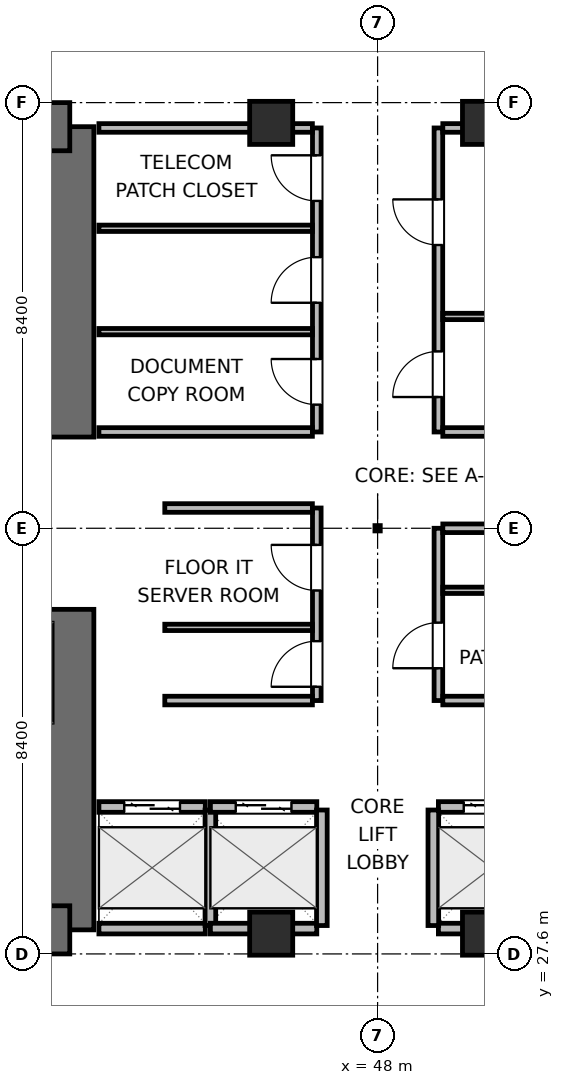
"""IFC4 building model, lengths in metres.
Left out: names, types, materials, properties, quantities, classifications, styles, units other than length and angle.
Written with IfcOpenShell. Run it as: python <this file> out.ifc"""

import sys

from ifc_helpers import new_model, si_unit, direction, frame, frame_2d, origin, origin_2d, place, context, subcontext, project, spatial, rectangle, extrude, element, fill, save


model = new_model("IFC4")
c1 = context("Model", 3, precision=1e-05, world=origin(), true_north=direction((0.0, 1.0)))
c2 = subcontext(c1, "Body", "Model", "MODEL_VIEW")
j1 = project(units=[si_unit("LENGTHUNIT", "METRE"), si_unit("PLANEANGLEUNIT", "RADIAN")], contexts=[c1])
p1 = place(None, origin())
s1 = spatial("IfcSite", under=j1, at=p1, CompositionType="ELEMENT")
p2 = place(p1, origin())
s2 = spatial("IfcBuilding", under=s1, at=p2, CompositionType="ELEMENT")
p3 = place(p2, frame((0.0, 0.0, 41.1)))
s3 = spatial("IfcBuildingStorey", under=s2, at=p3, CompositionType="ELEMENT", Elevation=41.1)
p4 = place(p3, frame((41.925, 28.075, 0.0), z_axis=(0.0, 0.0, 1.0), x_axis=(0.0, 1.0, 0.0)))
e1 = element("IfcWall", 1, at=p4, inside=s3, PredefinedType="SHEAR", context=c2, shape_type="SweptSolid", body=[
    extrude(rectangle(XDim=6.325, YDim=0.95, at=frame_2d((3.163, 0.0))), origin(), (0.0, 0.0, 1.0), 3.9),
])
p5 = place(p3, frame((41.925, 37.8, 0.0), z_axis=(0.0, 0.0, 1.0), x_axis=(0.0, 1.0, 0.0)))
e2 = element("IfcWall", 2, at=p5, inside=s3, PredefinedType="SHEAR", context=c2, shape_type="SweptSolid", body=[
    extrude(rectangle(XDim=6.125, YDim=0.95, at=frame_2d((3.062, 0.0))), origin(), (0.0, 0.0, 1.0), 3.9),
])
p6 = place(p3, frame((32.875, 28.075, 0.0), z_axis=(0.0, 0.0, 1.0), x_axis=(1.0, 0.0, 0.0)))
e3 = element("IfcWall", 3, at=p6, inside=s3, PredefinedType="SHEAR", context=c2, shape_type="SweptSolid", body=[
    extrude(rectangle(XDim=9.05, YDim=0.95, at=frame_2d((4.525, 0.0))), origin(), (0.0, 0.0, 1.0), 3.9),
])
p7 = place(p6, frame((4.975, 0.0, 0.0)))
e4 = element("IfcOpeningElement", 4, at=p7, cuts=e3, PredefinedType="OPENING", context=c2, shape_type="SweptSolid", body=[
    extrude(rectangle(XDim=1.05, YDim=2.04, at=frame_2d((0.525, 1.02))), frame((0.0, 0.485, 0.0), z_axis=(0.0, -1.0, 0.0), x_axis=(1.0, 0.0, 0.0)), (0.0, 0.0, 1.0), 0.97),
])
p8 = place(p3, frame((32.875, 43.925, 0.0), z_axis=(0.0, 0.0, 1.0), x_axis=(1.0, 0.0, 0.0)))
e5 = element("IfcWall", 5, at=p8, inside=s3, PredefinedType="SHEAR", context=c2, shape_type="SweptSolid", body=[
    extrude(rectangle(XDim=9.05, YDim=0.95, at=frame_2d((4.525, 0.0))), origin(), (0.0, 0.0, 1.0), 3.9),
])
p9 = place(p8, frame((0.975, 0.0, 0.0)))
e6 = element("IfcOpeningElement", 6, at=p9, cuts=e5, PredefinedType="OPENING", context=c2, shape_type="SweptSolid", body=[
    extrude(rectangle(XDim=0.95, YDim=2.04, at=frame_2d((0.475, 1.02))), frame((0.0, 0.485, 0.0), z_axis=(0.0, -1.0, 0.0), x_axis=(1.0, 0.0, 0.0)), (0.0, 0.0, 1.0), 0.97),
])
p10 = place(p8, frame((4.225, 0.0, 0.0)))
e7 = element("IfcOpeningElement", 7, at=p10, cuts=e5, PredefinedType="OPENING", context=c2, shape_type="SweptSolid", body=[
    extrude(rectangle(XDim=0.9, YDim=2.02, at=frame_2d((0.45, 1.01))), frame((0.0, 0.485, 0.0), z_axis=(0.0, -1.0, 0.0), x_axis=(1.0, 0.0, 0.0)), (0.0, 0.0, 1.0), 0.97),
])
p11 = place(p8, frame((7.125, 0.0, 0.0)))
e8 = element("IfcOpeningElement", 8, at=p11, cuts=e5, PredefinedType="OPENING", context=c2, shape_type="SweptSolid", body=[
    extrude(rectangle(XDim=0.9, YDim=2.02, at=frame_2d((0.45, 1.01))), frame((0.0, 0.485, 0.0), z_axis=(0.0, -1.0, 0.0), x_axis=(1.0, 0.0, 0.0)), (0.0, 0.0, 1.0), 0.97),
])
for number, where, z_axis, x_axis in (
    (9, (45.9, 28.0, 0.0), (0.0, 0.0, 1.0), (1.0, 0.0, 0.0)),
    (10, (50.1, 28.0, 0.0), (0.0, 0.0, 1.0), (1.0, 0.0, 0.0)),
    (11, (45.9, 44.0, 0.0), (0.0, 0.0, 1.0), (1.0, 0.0, 0.0)),
    (12, (50.1, 44.0, 0.0), (0.0, 0.0, 1.0), (1.0, 0.0, 0.0)),
):
    element("IfcColumn", number, at=place(p3, frame(where, z_axis=z_axis, x_axis=x_axis)), inside=s3, PredefinedType="COLUMN", context=c2, shape_type="SweptSolid", body=[
        extrude(rectangle(XDim=0.85, YDim=0.85, at=origin_2d()), origin(), (0.0, 0.0, 1.0), 3.9),
    ])
p12 = place(p3, frame((42.5, 30.5, 0.0), z_axis=(0.0, 0.0, 1.0), x_axis=(1.0, 0.0, 0.0)))
e13 = element("IfcWall", 13, at=p12, inside=s3, PredefinedType="PARTITIONING", context=c2, shape_type="SweptSolid", body=[
    extrude(rectangle(XDim=2.1, YDim=0.21, at=frame_2d((1.05, 0.0))), origin(), (0.0, 0.0, 1.0), 3.64),
])
p13 = place(p12, frame((0.5, 0.0, 0.0)))
e14 = element("IfcOpeningElement", 14, at=p13, cuts=e13, PredefinedType="OPENING", context=c2, shape_type="SweptSolid", body=[
    extrude(rectangle(XDim=1.1, YDim=2.04, at=frame_2d((0.55, 1.02))), frame((0.0, 0.115, 0.0), z_axis=(0.0, -1.0, 0.0), x_axis=(1.0, 0.0, 0.0)), (0.0, 0.0, 1.0), 0.23),
])
p14 = place(p3, frame((42.5, 28.1, 0.0), z_axis=(0.0, 0.0, 1.0), x_axis=(1.0, 0.0, 0.0)))
e15 = element("IfcWall", 15, at=p14, inside=s3, PredefinedType="PARTITIONING", context=c2, shape_type="SweptSolid", body=[
    extrude(rectangle(XDim=2.1, YDim=0.21, at=frame_2d((1.05, 0.0))), origin(), (0.0, 0.0, 1.0), 2.525),
])
p15 = place(p3, frame((44.7, 28.16, 0.0), z_axis=(0.0, 0.0, 1.0), x_axis=(0.0, 1.0, 0.0)))
e16 = element("IfcWall", 16, at=p15, inside=s3, PredefinedType="PARTITIONING", context=c2, shape_type="SweptSolid", body=[
    extrude(rectangle(XDim=2.28, YDim=0.21, at=frame_2d((1.14, 0.0))), origin(), (0.0, 0.0, 1.0), 3.64),
])
p16 = place(p3, frame((44.7, 30.5, 0.0), z_axis=(0.0, 0.0, 1.0), x_axis=(1.0, 0.0, 0.0)))
e17 = element("IfcWall", 17, at=p16, inside=s3, PredefinedType="PARTITIONING", context=c2, shape_type="SweptSolid", body=[
    extrude(rectangle(XDim=2.1, YDim=0.21, at=frame_2d((1.05, 0.0))), origin(), (0.0, 0.0, 1.0), 3.64),
])
p17 = place(p16, frame((0.5, 0.0, 0.0)))
e18 = element("IfcOpeningElement", 18, at=p17, cuts=e17, PredefinedType="OPENING", context=c2, shape_type="SweptSolid", body=[
    extrude(rectangle(XDim=1.1, YDim=2.04, at=frame_2d((0.55, 1.02))), frame((0.0, 0.115, 0.0), z_axis=(0.0, -1.0, 0.0), x_axis=(1.0, 0.0, 0.0)), (0.0, 0.0, 1.0), 0.23),
])
p18 = place(p3, frame((44.7, 28.1, 0.0), z_axis=(0.0, 0.0, 1.0), x_axis=(1.0, 0.0, 0.0)))
e19 = element("IfcWall", 19, at=p18, inside=s3, PredefinedType="PARTITIONING", context=c2, shape_type="SweptSolid", body=[
    extrude(rectangle(XDim=2.1, YDim=0.21, at=frame_2d((1.05, 0.0))), origin(), (0.0, 0.0, 1.0), 2.525),
])
p19 = place(p3, frame((46.9, 28.16, 0.0), z_axis=(0.0, 0.0, 1.0), x_axis=(0.0, 1.0, 0.0)))
e20 = element("IfcWall", 20, at=p19, inside=s3, PredefinedType="PARTITIONING", context=c2, shape_type="SweptSolid", body=[
    extrude(rectangle(XDim=2.28, YDim=0.21, at=frame_2d((1.14, 0.0))), origin(), (0.0, 0.0, 1.0), 3.64),
])
p20 = place(p3, frame((49.2, 30.5, 0.0), z_axis=(0.0, 0.0, 1.0), x_axis=(1.0, 0.0, 0.0)))
e21 = element("IfcWall", 21, at=p20, inside=s3, PredefinedType="PARTITIONING", context=c2, shape_type="SweptSolid", body=[
    extrude(rectangle(XDim=2.1, YDim=0.21, at=frame_2d((1.05, 0.0))), origin(), (0.0, 0.0, 1.0), 3.64),
])
p21 = place(p20, frame((0.5, 0.0, 0.0)))
e22 = element("IfcOpeningElement", 22, at=p21, cuts=e21, PredefinedType="OPENING", context=c2, shape_type="SweptSolid", body=[
    extrude(rectangle(XDim=1.1, YDim=2.04, at=frame_2d((0.55, 1.02))), frame((0.0, 0.115, 0.0), z_axis=(0.0, -1.0, 0.0), x_axis=(1.0, 0.0, 0.0)), (0.0, 0.0, 1.0), 0.23),
])
p22 = place(p3, frame((49.2, 28.1, 0.0), z_axis=(0.0, 0.0, 1.0), x_axis=(1.0, 0.0, 0.0)))
e23 = element("IfcWall", 23, at=p22, inside=s3, PredefinedType="PARTITIONING", context=c2, shape_type="SweptSolid", body=[
    extrude(rectangle(XDim=2.1, YDim=0.21, at=frame_2d((1.05, 0.0))), origin(), (0.0, 0.0, 1.0), 2.525),
])
p23 = place(p3, frame((49.1, 28.16, 0.0), z_axis=(0.0, 0.0, 1.0), x_axis=(0.0, 1.0, 0.0)))
e24 = element("IfcWall", 24, at=p23, inside=s3, PredefinedType="PARTITIONING", context=c2, shape_type="SweptSolid", body=[
    extrude(rectangle(XDim=2.28, YDim=0.21, at=frame_2d((1.14, 0.0))), origin(), (0.0, 0.0, 1.0), 3.64),
])
p24 = place(p3, frame((46.8, 32.6, 0.0), z_axis=(0.0, 0.0, 1.0), x_axis=(0.0, 1.0, 0.0)))
e25 = element("IfcWall", 25, at=p24, inside=s3, PredefinedType="PARTITIONING", context=c2, shape_type="SweptSolid", body=[
    extrude(rectangle(XDim=3.8, YDim=0.17, at=frame_2d((1.9, 0.0))), origin(), (0.0, 0.0, 1.0), 3.64),
])
p25 = place(p24, frame((0.272, 0.0, 0.0)))
e26 = element("IfcOpeningElement", 26, at=p25, cuts=e25, PredefinedType="OPENING", context=c2, shape_type="SweptSolid", body=[
    extrude(rectangle(XDim=0.9, YDim=2.02, at=frame_2d((0.45, 1.01))), frame((0.0, 0.095, 0.0), z_axis=(0.0, -1.0, 0.0), x_axis=(1.0, 0.0, 0.0)), (0.0, 0.0, 1.0), 0.19),
])
p26 = place(p24, frame((2.172, 0.0, 0.0)))
e27 = element("IfcOpeningElement", 27, at=p26, cuts=e25, PredefinedType="OPENING", context=c2, shape_type="SweptSolid", body=[
    extrude(rectangle(XDim=0.9, YDim=2.02, at=frame_2d((0.45, 1.01))), frame((0.0, 0.095, 0.0), z_axis=(0.0, -1.0, 0.0), x_axis=(1.0, 0.0, 0.0)), (0.0, 0.0, 1.0), 0.19),
])
for number, where, z_axis, x_axis in (
    (28, (43.8, 32.6, 0.0), (0.0, 0.0, 1.0), (1.0, 0.0, 0.0)),
    (29, (43.8, 36.4, 0.0), (0.0, 0.0, 1.0), (1.0, 0.0, 0.0)),
):
    element("IfcWall", number, at=place(p3, frame(where, z_axis=z_axis, x_axis=x_axis)), inside=s3, PredefinedType="PARTITIONING", context=c2, shape_type="SweptSolid", body=[
        extrude(rectangle(XDim=2.913, YDim=0.17, at=frame_2d((1.457, 0.0))), origin(), (0.0, 0.0, 1.0), 3.64),
    ])
p27 = place(p3, frame((43.8, 34.044, 0.0), z_axis=(0.0, 0.0, 1.0), x_axis=(1.0, 0.0, 0.0)))
e30 = element("IfcWall", 30, at=p27, inside=s3, PredefinedType="PARTITIONING", context=c2, shape_type="SweptSolid", body=[
    extrude(rectangle(XDim=2.913, YDim=0.125, at=frame_2d((1.457, 0.0))), origin(), (0.0, 0.0, 1.0), 3.64),
])
p28 = place(p3, frame((49.2, 32.6, 0.0), z_axis=(0.0, 0.0, 1.0), x_axis=(0.0, 1.0, 0.0)))
e31 = element("IfcWall", 31, at=p28, inside=s3, PredefinedType="PARTITIONING", context=c2, shape_type="SweptSolid", body=[
    extrude(rectangle(XDim=3.4, YDim=0.17, at=frame_2d((1.7, 0.0))), origin(), (0.0, 0.0, 1.0), 3.64),
])
p29 = place(p28, frame((0.638, 0.0, 0.0)))
e32 = element("IfcOpeningElement", 32, at=p29, cuts=e31, PredefinedType="OPENING", context=c2, shape_type="SweptSolid", body=[
    extrude(rectangle(XDim=0.9, YDim=2.02, at=frame_2d((0.45, 1.01))), frame((0.0, 0.095, 0.0), z_axis=(0.0, -1.0, 0.0), x_axis=(1.0, 0.0, 0.0)), (0.0, 0.0, 1.0), 0.19),
])
for number, where, z_axis, x_axis in (
    (33, (49.287, 32.6, 0.0), (0.0, 0.0, 1.0), (1.0, 0.0, 0.0)),
    (34, (49.287, 36.0, 0.0), (0.0, 0.0, 1.0), (1.0, 0.0, 0.0)),
):
    element("IfcWall", number, at=place(p3, frame(where, z_axis=z_axis, x_axis=x_axis)), inside=s3, PredefinedType="PARTITIONING", context=c2, shape_type="SweptSolid", body=[
        extrude(rectangle(XDim=2.913, YDim=0.17, at=frame_2d((1.457, 0.0))), origin(), (0.0, 0.0, 1.0), 3.64),
    ])
p30 = place(p3, frame((49.287, 34.776, 0.0), z_axis=(0.0, 0.0, 1.0), x_axis=(1.0, 0.0, 0.0)))
e35 = element("IfcWall", 35, at=p30, inside=s3, PredefinedType="PARTITIONING", context=c2, shape_type="SweptSolid", body=[
    extrude(rectangle(XDim=2.913, YDim=0.125, at=frame_2d((1.457, 0.0))), origin(), (0.0, 0.0, 1.0), 3.64),
])
p31 = place(p3, frame((46.8, 37.9, 0.0), z_axis=(0.0, 0.0, 1.0), x_axis=(0.0, 1.0, 0.0)))
e36 = element("IfcWall", 36, at=p31, inside=s3, PredefinedType="PARTITIONING", context=c2, shape_type="SweptSolid", body=[
    extrude(rectangle(XDim=6.0, YDim=0.17, at=frame_2d((3.0, 0.0))), origin(), (0.0, 0.0, 1.0), 3.64),
])
p32 = place(p31, frame((0.54, 0.0, 0.0)))
e37 = element("IfcOpeningElement", 37, at=p32, cuts=e36, PredefinedType="OPENING", context=c2, shape_type="SweptSolid", body=[
    extrude(rectangle(XDim=0.9, YDim=2.02, at=frame_2d((0.45, 1.01))), frame((0.0, 0.095, 0.0), z_axis=(0.0, -1.0, 0.0), x_axis=(1.0, 0.0, 0.0)), (0.0, 0.0, 1.0), 0.19),
])
p33 = place(p31, frame((2.55, 0.0, 0.0)))
e38 = element("IfcOpeningElement", 38, at=p33, cuts=e36, PredefinedType="OPENING", context=c2, shape_type="SweptSolid", body=[
    extrude(rectangle(XDim=0.9, YDim=2.02, at=frame_2d((0.45, 1.01))), frame((0.0, 0.095, 0.0), z_axis=(0.0, -1.0, 0.0), x_axis=(1.0, 0.0, 0.0)), (0.0, 0.0, 1.0), 0.19),
])
p34 = place(p31, frame((4.56, 0.0, 0.0)))
e39 = element("IfcOpeningElement", 39, at=p34, cuts=e36, PredefinedType="OPENING", context=c2, shape_type="SweptSolid", body=[
    extrude(rectangle(XDim=0.9, YDim=2.02, at=frame_2d((0.45, 1.01))), frame((0.0, 0.095, 0.0), z_axis=(0.0, -1.0, 0.0), x_axis=(1.0, 0.0, 0.0)), (0.0, 0.0, 1.0), 0.19),
])
p35 = place(p3, frame((42.5, 37.9, 0.0), z_axis=(0.0, 0.0, 1.0), x_axis=(1.0, 0.0, 0.0)))
e40 = element("IfcWall", 40, at=p35, inside=s3, PredefinedType="PARTITIONING", context=c2, shape_type="SweptSolid", body=[
    extrude(rectangle(XDim=4.213, YDim=0.17, at=frame_2d((2.106, 0.0))), origin(), (0.0, 0.0, 1.0), 3.64),
])
p36 = place(p3, frame((42.5, 43.9, 0.0), z_axis=(0.0, 0.0, 1.0), x_axis=(1.0, 0.0, 0.0)))
e41 = element("IfcWall", 41, at=p36, inside=s3, PredefinedType="PARTITIONING", context=c2, shape_type="SweptSolid", body=[
    extrude(rectangle(XDim=4.213, YDim=0.17, at=frame_2d((2.106, 0.0))), origin(), (0.0, 0.0, 1.0), 2.525),
])
for number, where, z_axis, x_axis in (
    (42, (42.5, 39.88, 0.0), (0.0, 0.0, 1.0), (1.0, 0.0, 0.0)),
    (43, (42.5, 41.92, 0.0), (0.0, 0.0, 1.0), (1.0, 0.0, 0.0)),
):
    element("IfcWall", number, at=place(p3, frame(where, z_axis=z_axis, x_axis=x_axis)), inside=s3, PredefinedType="PARTITIONING", context=c2, shape_type="SweptSolid", body=[
        extrude(rectangle(XDim=4.213, YDim=0.125, at=frame_2d((2.106, 0.0))), origin(), (0.0, 0.0, 1.0), 3.64),
    ])
p37 = place(p3, frame((49.2, 37.9, 0.0), z_axis=(0.0, 0.0, 1.0), x_axis=(0.0, 1.0, 0.0)))
e44 = element("IfcWall", 44, at=p37, inside=s3, PredefinedType="PARTITIONING", context=c2, shape_type="SweptSolid", body=[
    extrude(rectangle(XDim=6.0, YDim=0.17, at=frame_2d((3.0, 0.0))), origin(), (0.0, 0.0, 1.0), 3.64),
])
p38 = place(p37, frame((0.69, 0.0, 0.0)))
e45 = element("IfcOpeningElement", 45, at=p38, cuts=e44, PredefinedType="OPENING", context=c2, shape_type="SweptSolid", body=[
    extrude(rectangle(XDim=0.9, YDim=2.02, at=frame_2d((0.45, 1.01))), frame((0.0, 0.095, 0.0), z_axis=(0.0, -1.0, 0.0), x_axis=(1.0, 0.0, 0.0)), (0.0, 0.0, 1.0), 0.19),
])
p39 = place(p37, frame((3.69, 0.0, 0.0)))
e46 = element("IfcOpeningElement", 46, at=p39, cuts=e44, PredefinedType="OPENING", context=c2, shape_type="SweptSolid", body=[
    extrude(rectangle(XDim=0.9, YDim=2.02, at=frame_2d((0.45, 1.01))), frame((0.0, 0.095, 0.0), z_axis=(0.0, -1.0, 0.0), x_axis=(1.0, 0.0, 0.0)), (0.0, 0.0, 1.0), 0.19),
])
p40 = place(p3, frame((49.287, 37.9, 0.0), z_axis=(0.0, 0.0, 1.0), x_axis=(1.0, 0.0, 0.0)))
e47 = element("IfcWall", 47, at=p40, inside=s3, PredefinedType="PARTITIONING", context=c2, shape_type="SweptSolid", body=[
    extrude(rectangle(XDim=4.113, YDim=0.17, at=frame_2d((2.056, 0.0))), origin(), (0.0, 0.0, 1.0), 3.64),
])
p41 = place(p3, frame((49.287, 43.9, 0.0), z_axis=(0.0, 0.0, 1.0), x_axis=(1.0, 0.0, 0.0)))
e48 = element("IfcWall", 48, at=p41, inside=s3, PredefinedType="PARTITIONING", context=c2, shape_type="SweptSolid", body=[
    extrude(rectangle(XDim=4.113, YDim=0.17, at=frame_2d((2.056, 0.0))), origin(), (0.0, 0.0, 1.0), 2.525),
])
p42 = place(p3, frame((49.287, 40.18, 0.0), z_axis=(0.0, 0.0, 1.0), x_axis=(1.0, 0.0, 0.0)))
e49 = element("IfcWall", 49, at=p42, inside=s3, PredefinedType="PARTITIONING", context=c2, shape_type="SweptSolid", body=[
    extrude(rectangle(XDim=4.113, YDim=0.125, at=frame_2d((2.056, 0.0))), origin(), (0.0, 0.0, 1.0), 3.64),
])
p43 = place(p13, origin())
e50 = element("IfcDoor", 50, at=p43, inside=s3, OperationType="DOUBLE_DOOR_SLIDING", PredefinedType="DOOR", context=c2, shape_type="SweptSolid", body=[
    extrude(rectangle(XDim=1.1, YDim=2.04, at=frame_2d((0.55, 1.02))), frame((0.0, 0.025, 0.0), z_axis=(0.0, -1.0, 0.0), x_axis=(1.0, 0.0, 0.0)), (0.0, 0.0, 1.0), 0.05),
])
fill(e14, e50)
p44 = place(p17, origin())
e51 = element("IfcDoor", 51, at=p44, inside=s3, OperationType="DOUBLE_DOOR_SLIDING", PredefinedType="DOOR", context=c2, shape_type="SweptSolid", body=[
    extrude(rectangle(XDim=1.1, YDim=2.04, at=frame_2d((0.55, 1.02))), frame((0.0, 0.025, 0.0), z_axis=(0.0, -1.0, 0.0), x_axis=(1.0, 0.0, 0.0)), (0.0, 0.0, 1.0), 0.05),
])
fill(e18, e51)
p45 = place(p21, origin())
e52 = element("IfcDoor", 52, at=p45, inside=s3, OperationType="DOUBLE_DOOR_SLIDING", PredefinedType="DOOR", context=c2, shape_type="SweptSolid", body=[
    extrude(rectangle(XDim=1.1, YDim=2.04, at=frame_2d((0.55, 1.02))), frame((0.0, 0.025, 0.0), z_axis=(0.0, -1.0, 0.0), x_axis=(1.0, 0.0, 0.0)), (0.0, 0.0, 1.0), 0.05),
])
fill(e22, e52)
p46 = place(p25, origin())
e53 = element("IfcDoor", 53, at=p46, inside=s3, OperationType="SINGLE_SWING_LEFT", PredefinedType="DOOR", context=c2, shape_type="SweptSolid", body=[
    extrude(rectangle(XDim=0.9, YDim=2.02, at=frame_2d((0.45, 1.01))), frame((0.0, 0.025, 0.0), z_axis=(0.0, -1.0, 0.0), x_axis=(1.0, 0.0, 0.0)), (0.0, 0.0, 1.0), 0.05),
])
fill(e26, e53)
p47 = place(p26, origin())
e54 = element("IfcDoor", 54, at=p47, inside=s3, OperationType="SINGLE_SWING_RIGHT", PredefinedType="DOOR", context=c2, shape_type="SweptSolid", body=[
    extrude(rectangle(XDim=0.9, YDim=2.02, at=frame_2d((0.45, 1.01))), frame((0.0, 0.025, 0.0), z_axis=(0.0, -1.0, 0.0), x_axis=(1.0, 0.0, 0.0)), (0.0, 0.0, 1.0), 0.05),
])
fill(e27, e54)
p48 = place(p29, origin())
e55 = element("IfcDoor", 55, at=p48, inside=s3, OperationType="SINGLE_SWING_LEFT", PredefinedType="DOOR", context=c2, shape_type="SweptSolid", body=[
    extrude(rectangle(XDim=0.9, YDim=2.02, at=frame_2d((0.45, 1.01))), frame((0.0, 0.025, 0.0), z_axis=(0.0, -1.0, 0.0), x_axis=(1.0, 0.0, 0.0)), (0.0, 0.0, 1.0), 0.05),
])
fill(e32, e55)
p49 = place(p32, origin())
e56 = element("IfcDoor", 56, at=p49, inside=s3, OperationType="SINGLE_SWING_RIGHT", PredefinedType="DOOR", context=c2, shape_type="SweptSolid", body=[
    extrude(rectangle(XDim=0.9, YDim=2.02, at=frame_2d((0.45, 1.01))), frame((0.0, 0.025, 0.0), z_axis=(0.0, -1.0, 0.0), x_axis=(1.0, 0.0, 0.0)), (0.0, 0.0, 1.0), 0.05),
])
fill(e37, e56)
p50 = place(p33, origin())
e57 = element("IfcDoor", 57, at=p50, inside=s3, OperationType="SINGLE_SWING_LEFT", PredefinedType="DOOR", context=c2, shape_type="SweptSolid", body=[
    extrude(rectangle(XDim=0.9, YDim=2.02, at=frame_2d((0.45, 1.01))), frame((0.0, 0.025, 0.0), z_axis=(0.0, -1.0, 0.0), x_axis=(1.0, 0.0, 0.0)), (0.0, 0.0, 1.0), 0.05),
])
fill(e38, e57)
p51 = place(p34, origin())
e58 = element("IfcDoor", 58, at=p51, inside=s3, OperationType="SINGLE_SWING_RIGHT", PredefinedType="DOOR", context=c2, shape_type="SweptSolid", body=[
    extrude(rectangle(XDim=0.9, YDim=2.02, at=frame_2d((0.45, 1.01))), frame((0.0, 0.025, 0.0), z_axis=(0.0, -1.0, 0.0), x_axis=(1.0, 0.0, 0.0)), (0.0, 0.0, 1.0), 0.05),
])
fill(e39, e58)
p52 = place(p38, origin())
e59 = element("IfcDoor", 59, at=p52, inside=s3, OperationType="SINGLE_SWING_LEFT", PredefinedType="DOOR", context=c2, shape_type="SweptSolid", body=[
    extrude(rectangle(XDim=0.9, YDim=2.02, at=frame_2d((0.45, 1.01))), frame((0.0, 0.025, 0.0), z_axis=(0.0, -1.0, 0.0), x_axis=(1.0, 0.0, 0.0)), (0.0, 0.0, 1.0), 0.05),
])
fill(e45, e59)
p53 = place(p39, origin())
e60 = element("IfcDoor", 60, at=p53, inside=s3, OperationType="SINGLE_SWING_RIGHT", PredefinedType="DOOR", context=c2, shape_type="SweptSolid", body=[
    extrude(rectangle(XDim=0.9, YDim=2.02, at=frame_2d((0.45, 1.01))), frame((0.0, 0.025, 0.0), z_axis=(0.0, -1.0, 0.0), x_axis=(1.0, 0.0, 0.0)), (0.0, 0.0, 1.0), 0.05),
])
fill(e46, e60)
save(model, sys.argv[1])
